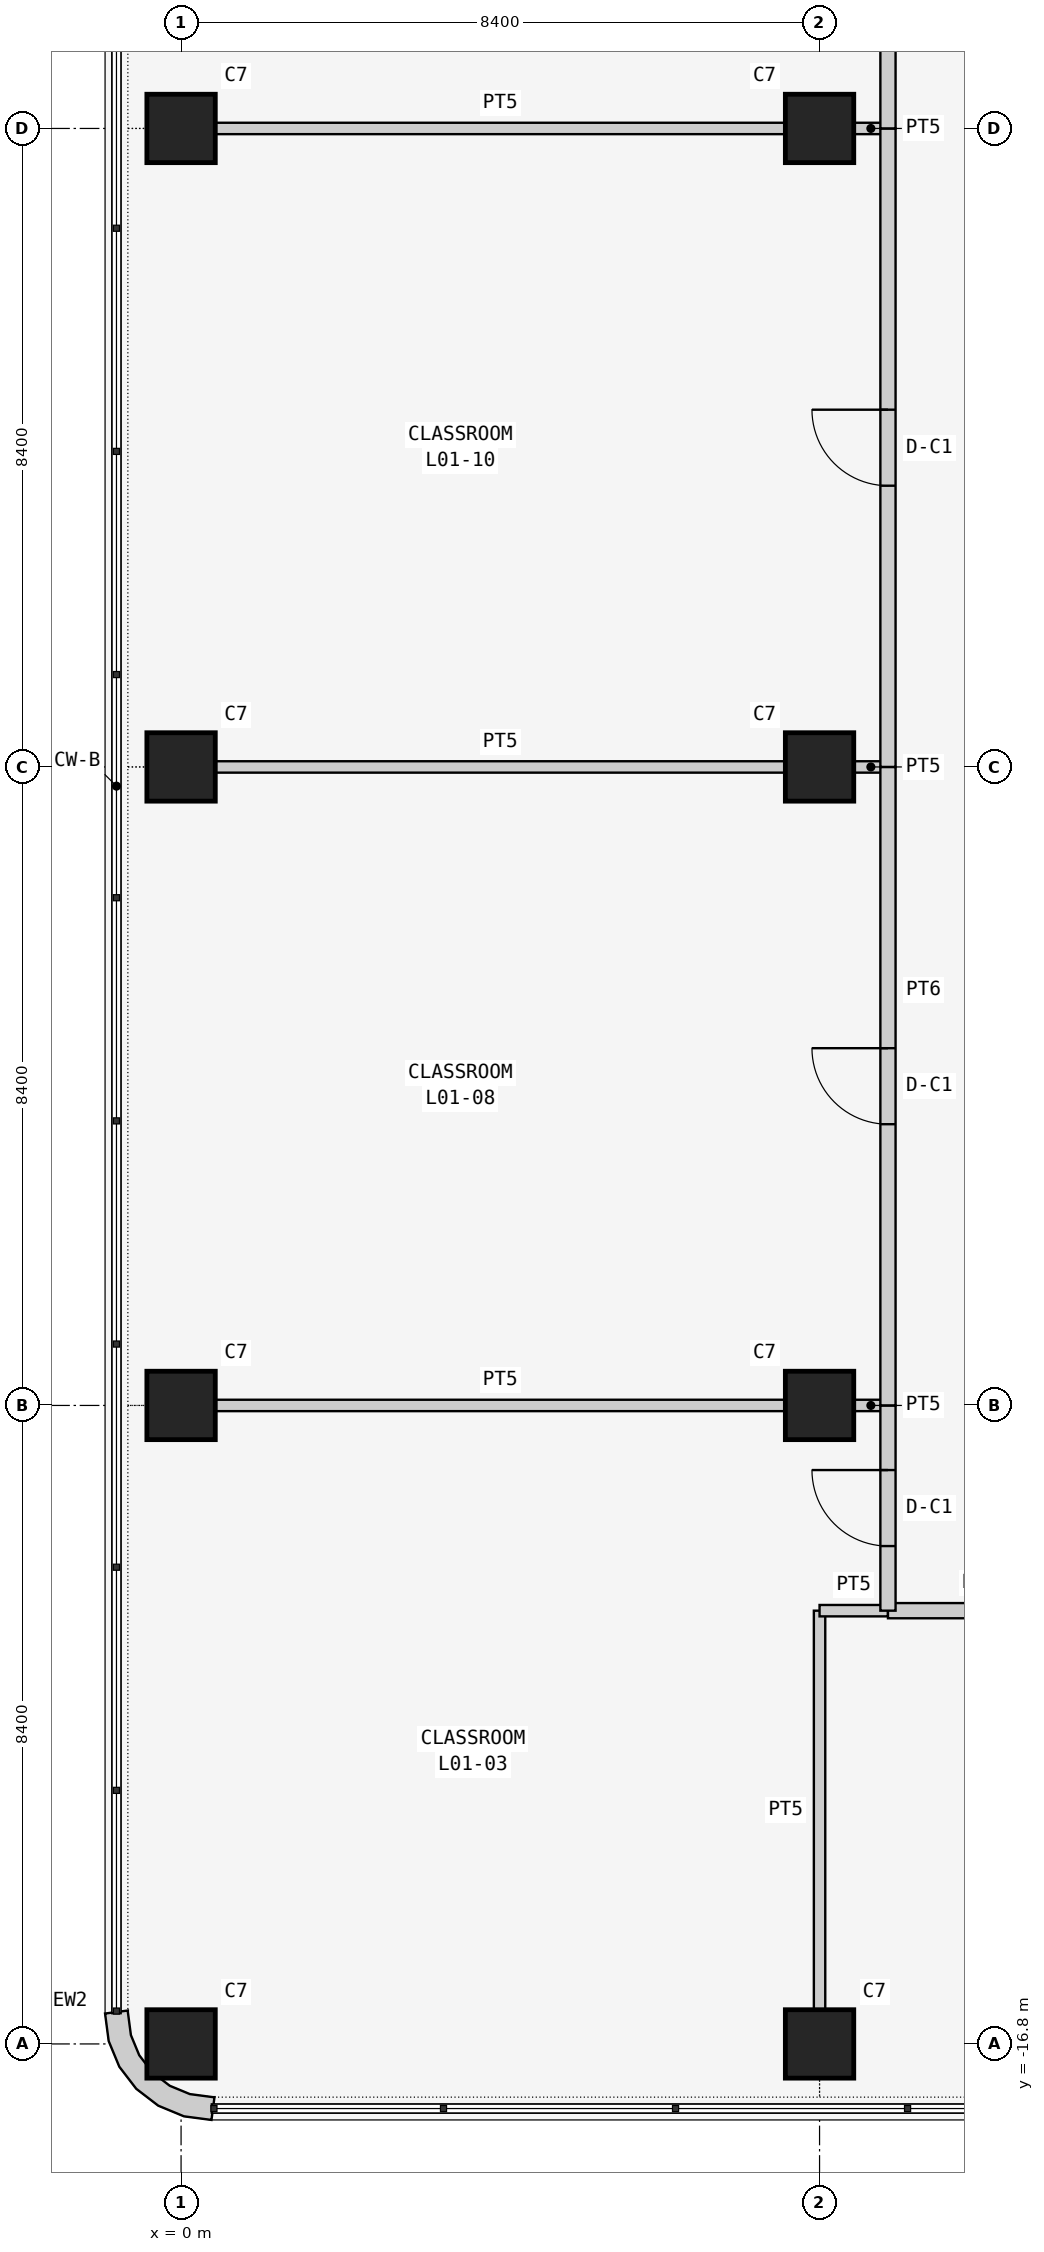
"""IFC4 building model, lengths in metres.
Left out: names, types, materials, properties, quantities, classifications, styles, units other than length and angle.
Written with IfcOpenShell. Run it as: python <this file> out.ifc"""

import sys

from ifc_helpers import new_model, si_unit, direction, frame, frame_2d, origin, origin_2d, place, context, subcontext, project, spatial, polyline, rectangle, outline, extrude, element, fill, save


model = new_model("IFC4")
c1 = context("Model", 3, precision=1e-05, world=origin(), true_north=direction((0.0, 1.0)))
c2 = subcontext(c1, "Body", "Model", "MODEL_VIEW")
j1 = project(units=[si_unit("LENGTHUNIT", "METRE"), si_unit("PLANEANGLEUNIT", "RADIAN")], contexts=[c1])
p1 = place(None, origin())
s1 = spatial("IfcSite", under=j1, at=p1, CompositionType="ELEMENT")
p2 = place(p1, origin())
s2 = spatial("IfcBuilding", under=s1, at=p2, CompositionType="ELEMENT")
p3 = place(p2, frame((0.0, 0.0, 6.0)))
s3 = spatial("IfcBuildingStorey", under=s2, at=p3, CompositionType="ELEMENT", Elevation=6.0)
for number, where, z_axis, x_axis in (
    (1, (0.0, -16.8, 0.0), (0.0, 0.0, 1.0), (1.0, 0.0, 0.0)),
    (2, (0.0, -8.4, 0.0), (0.0, 0.0, 1.0), (1.0, 0.0, 0.0)),
    (3, (0.0, 0.0, 0.0), (0.0, 0.0, 1.0), (1.0, 0.0, 0.0)),
    (4, (0.0, 8.4, 0.0), (0.0, 0.0, 1.0), (1.0, 0.0, 0.0)),
    (5, (8.4, -16.8, 0.0), (0.0, 0.0, 1.0), (1.0, 0.0, 0.0)),
    (6, (8.4, -8.4, 0.0), (0.0, 0.0, 1.0), (1.0, 0.0, 0.0)),
    (7, (8.4, 0.0, 0.0), (0.0, 0.0, 1.0), (1.0, 0.0, 0.0)),
    (8, (8.4, 8.4, 0.0), (0.0, 0.0, 1.0), (1.0, 0.0, 0.0)),
):
    element("IfcColumn", number, at=place(p3, frame(where, z_axis=z_axis, x_axis=x_axis)), inside=s3, PredefinedType="COLUMN", context=c2, shape_type="SweptSolid", body=[
        extrude(rectangle(XDim=0.9, YDim=0.9, at=origin_2d()), origin(), (0.0, 0.0, 1.0), 4.5),
    ])
p4 = place(p3, frame((-0.848, -16.355, 0.0), z_axis=(0.0, 0.0, 1.0), x_axis=(-0.707106781187, -0.707106781187, 0.0)))
e9 = element("IfcWall", 9, at=p4, inside=s3, PredefinedType="SOLIDWALL", context=c2, shape_type="SweptSolid", body=[
    extrude(outline(polyline([(0.139, 1.904), (-0.101, 1.72), (-0.087, 1.706), (0.1, 1.463), (0.209, 1.198), (0.247, 0.914), (0.209, 0.63), (0.1, 0.365), (-0.087, 0.122), (-0.101, 0.108), (0.139, -0.076), (0.362, 0.214), (0.502, 0.552), (0.549, 0.914), (0.502, 1.276), (0.362, 1.614), (0.139, 1.904)])), origin(), (0.0, 0.0, 1.0), 4.3),
])
p5 = place(p3, frame((8.4, -16.35, 0.0), z_axis=(0.0, 0.0, 1.0), x_axis=(0.0, 1.0, 0.0)))
e10 = element("IfcWall", 10, at=p5, inside=s3, PredefinedType="PARTITIONING", context=c2, shape_type="SweptSolid", body=[
    extrude(rectangle(XDim=5.25, YDim=0.15, at=frame_2d((2.625, 0.0))), origin(), (0.0, 0.0, 1.0), 3.543),
])
p6 = place(p3, frame((8.4, -11.1, 0.0), z_axis=(0.0, 0.0, 1.0), x_axis=(1.0, 0.0, 0.0)))
e11 = element("IfcWall", 11, at=p6, inside=s3, PredefinedType="PARTITIONING", context=c2, shape_type="SweptSolid", body=[
    extrude(rectangle(XDim=0.9, YDim=0.15, at=frame_2d((0.45, 0.0))), origin(), (0.0, 0.0, 1.0), 4.3),
])
p7 = place(p3, frame((9.3, -11.1, 0.0), z_axis=(0.0, 0.0, 1.0), x_axis=(1.0, 0.0, 0.0)))
e12 = element("IfcWall", 12, at=p7, inside=s3, PredefinedType="PARTITIONING", context=c2, shape_type="SweptSolid", body=[
    extrude(rectangle(XDim=2.4, YDim=0.2, at=frame_2d((1.2, 0.0))), origin(), (0.0, 0.0, 1.0), 4.3),
])
p8 = place(p3, frame((0.45, -8.4, 0.0), z_axis=(0.0, 0.0, 1.0), x_axis=(1.0, 0.0, 0.0)))
e13 = element("IfcWall", 13, at=p8, inside=s3, PredefinedType="PARTITIONING", context=c2, shape_type="SweptSolid", body=[
    extrude(rectangle(XDim=7.5, YDim=0.15, at=frame_2d((3.75, 0.0))), origin(), (0.0, 0.0, 1.0), 3.543),
])
p9 = place(p3, frame((8.85, -8.4, 0.0), z_axis=(0.0, 0.0, 1.0), x_axis=(1.0, 0.0, 0.0)))
e14 = element("IfcWall", 14, at=p9, inside=s3, PredefinedType="PARTITIONING", context=c2, shape_type="SweptSolid", body=[
    extrude(rectangle(XDim=0.45, YDim=0.15, at=frame_2d((0.225, 0.0))), origin(), (0.0, 0.0, 1.0), 3.543),
])
p10 = place(p3, frame((9.3, -8.4, 0.0), z_axis=(0.0, 0.0, 1.0), x_axis=(0.0, -1.0, 0.0)))
e15 = element("IfcWall", 15, at=p10, inside=s3, PredefinedType="PARTITIONING", context=c2, shape_type="SweptSolid", body=[
    extrude(rectangle(XDim=2.7, YDim=0.2, at=frame_2d((1.35, 0.0))), origin(), (0.0, 0.0, 1.0), 4.3),
])
p11 = place(p10, frame((0.85, 0.0, 0.0)))
e16 = element("IfcOpeningElement", 16, at=p11, cuts=e15, PredefinedType="OPENING", context=c2, shape_type="SweptSolid", body=[
    extrude(rectangle(XDim=1.0, YDim=2.1, at=frame_2d((0.5, 1.05))), frame((0.0, 0.11, 0.0), z_axis=(0.0, -1.0, 0.0), x_axis=(1.0, 0.0, 0.0)), (0.0, 0.0, 1.0), 0.22),
])
p12 = place(p3, frame((0.45, 0.0, 0.0), z_axis=(0.0, 0.0, 1.0), x_axis=(1.0, 0.0, 0.0)))
e17 = element("IfcWall", 17, at=p12, inside=s3, PredefinedType="PARTITIONING", context=c2, shape_type="SweptSolid", body=[
    extrude(rectangle(XDim=7.5, YDim=0.15, at=frame_2d((3.75, 0.0))), origin(), (0.0, 0.0, 1.0), 3.543),
])
p13 = place(p3, frame((8.85, 0.0, 0.0), z_axis=(0.0, 0.0, 1.0), x_axis=(1.0, 0.0, 0.0)))
e18 = element("IfcWall", 18, at=p13, inside=s3, PredefinedType="PARTITIONING", context=c2, shape_type="SweptSolid", body=[
    extrude(rectangle(XDim=0.45, YDim=0.15, at=frame_2d((0.225, 0.0))), origin(), (0.0, 0.0, 1.0), 3.543),
])
p14 = place(p3, frame((9.3, 0.0, 0.0), z_axis=(0.0, 0.0, 1.0), x_axis=(0.0, -1.0, 0.0)))
e19 = element("IfcWall", 19, at=p14, inside=s3, PredefinedType="PARTITIONING", context=c2, shape_type="SweptSolid", body=[
    extrude(rectangle(XDim=8.4, YDim=0.2, at=frame_2d((4.2, 0.0))), origin(), (0.0, 0.0, 1.0), 4.3),
])
p15 = place(p14, frame((3.7, 0.0, 0.0)))
e20 = element("IfcOpeningElement", 20, at=p15, cuts=e19, PredefinedType="OPENING", context=c2, shape_type="SweptSolid", body=[
    extrude(rectangle(XDim=1.0, YDim=2.1, at=frame_2d((0.5, 1.05))), frame((0.0, 0.11, 0.0), z_axis=(0.0, -1.0, 0.0), x_axis=(1.0, 0.0, 0.0)), (0.0, 0.0, 1.0), 0.22),
])
p16 = place(p3, frame((0.45, 8.4, 0.0), z_axis=(0.0, 0.0, 1.0), x_axis=(1.0, 0.0, 0.0)))
e21 = element("IfcWall", 21, at=p16, inside=s3, PredefinedType="PARTITIONING", context=c2, shape_type="SweptSolid", body=[
    extrude(rectangle(XDim=7.5, YDim=0.15, at=frame_2d((3.75, 0.0))), origin(), (0.0, 0.0, 1.0), 3.543),
])
p17 = place(p3, frame((8.85, 8.4, 0.0), z_axis=(0.0, 0.0, 1.0), x_axis=(1.0, 0.0, 0.0)))
e22 = element("IfcWall", 22, at=p17, inside=s3, PredefinedType="PARTITIONING", context=c2, shape_type="SweptSolid", body=[
    extrude(rectangle(XDim=0.45, YDim=0.15, at=frame_2d((0.225, 0.0))), origin(), (0.0, 0.0, 1.0), 3.543),
])
p18 = place(p3, frame((9.3, 8.4, 0.0), z_axis=(0.0, 0.0, 1.0), x_axis=(0.0, -1.0, 0.0)))
e23 = element("IfcWall", 23, at=p18, inside=s3, PredefinedType="PARTITIONING", context=c2, shape_type="SweptSolid", body=[
    extrude(rectangle(XDim=8.4, YDim=0.2, at=frame_2d((4.2, 0.0))), origin(), (0.0, 0.0, 1.0), 4.3),
])
p19 = place(p18, frame((3.7, 0.0, 0.0)))
e24 = element("IfcOpeningElement", 24, at=p19, cuts=e23, PredefinedType="OPENING", context=c2, shape_type="SweptSolid", body=[
    extrude(rectangle(XDim=1.0, YDim=2.1, at=frame_2d((0.5, 1.05))), frame((0.0, 0.11, 0.0), z_axis=(0.0, -1.0, 0.0), x_axis=(1.0, 0.0, 0.0)), (0.0, 0.0, 1.0), 0.22),
])
p20 = place(p3, frame((9.3, 15.9, 0.0), z_axis=(0.0, 0.0, 1.0), x_axis=(0.0, -1.0, 0.0)))
e25 = element("IfcWall", 25, at=p20, inside=s3, PredefinedType="PARTITIONING", context=c2, shape_type="SweptSolid", body=[
    extrude(rectangle(XDim=7.5, YDim=0.2, at=frame_2d((3.75, 0.0))), origin(), (0.0, 0.0, 1.0), 4.3),
])
p21 = place(p20, frame((3.25, 0.0, 0.0)))
e26 = element("IfcOpeningElement", 26, at=p21, cuts=e25, PredefinedType="OPENING", context=c2, shape_type="SweptSolid", body=[
    extrude(rectangle(XDim=1.0, YDim=2.1, at=frame_2d((0.5, 1.05))), frame((0.0, 0.11, 0.0), z_axis=(0.0, -1.0, 0.0), x_axis=(1.0, 0.0, 0.0)), (0.0, 0.0, 1.0), 0.22),
])
p22 = place(p11, frame((1.0, 0.0, 0.0), z_axis=(0.0, 0.0, 1.0), x_axis=(-1.0, 0.0, 0.0)))
e27 = element("IfcDoor", 27, at=p22, inside=s3, OperationType="SINGLE_SWING_RIGHT", PredefinedType="DOOR", context=c2, shape_type="SweptSolid", body=[
    extrude(rectangle(XDim=1.0, YDim=2.1, at=frame_2d((0.5, 1.05))), frame((0.0, 0.025, 0.0), z_axis=(0.0, -1.0, 0.0), x_axis=(1.0, 0.0, 0.0)), (0.0, 0.0, 1.0), 0.05),
])
fill(e16, e27)
p23 = place(p15, frame((1.0, 0.0, 0.0), z_axis=(0.0, 0.0, 1.0), x_axis=(-1.0, 0.0, 0.0)))
e28 = element("IfcDoor", 28, at=p23, inside=s3, OperationType="SINGLE_SWING_RIGHT", PredefinedType="DOOR", context=c2, shape_type="SweptSolid", body=[
    extrude(rectangle(XDim=1.0, YDim=2.1, at=frame_2d((0.5, 1.05))), frame((0.0, 0.025, 0.0), z_axis=(0.0, -1.0, 0.0), x_axis=(1.0, 0.0, 0.0)), (0.0, 0.0, 1.0), 0.05),
])
fill(e20, e28)
p24 = place(p19, frame((1.0, 0.0, 0.0), z_axis=(0.0, 0.0, 1.0), x_axis=(-1.0, 0.0, 0.0)))
e29 = element("IfcDoor", 29, at=p24, inside=s3, OperationType="SINGLE_SWING_RIGHT", PredefinedType="DOOR", context=c2, shape_type="SweptSolid", body=[
    extrude(rectangle(XDim=1.0, YDim=2.1, at=frame_2d((0.5, 1.05))), frame((0.0, 0.025, 0.0), z_axis=(0.0, -1.0, 0.0), x_axis=(1.0, 0.0, 0.0)), (0.0, 0.0, 1.0), 0.05),
])
fill(e24, e29)
save(model, sys.argv[1])
